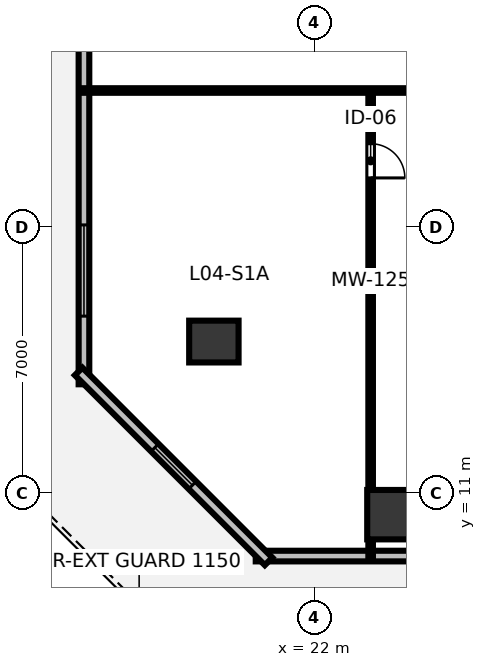
"""IFC4 building model, lengths in metres.
Left out: names, types, materials, properties, quantities, classifications, styles, units other than length and angle.
Written with IfcOpenShell. Run it as: python <this file> out.ifc"""

import sys

from ifc_helpers import new_model, si_unit, direction, frame, frame_2d, origin, origin_2d, place, context, subcontext, project, spatial, rectangle, hollow_rectangle, extrude, element, fill, save


model = new_model("IFC4")
c1 = context("Model", 3, precision=1e-05, world=origin(), true_north=direction((0.0, 1.0)))
c2 = subcontext(c1, "Body", "Model", "MODEL_VIEW")
j1 = project(units=[si_unit("LENGTHUNIT", "METRE"), si_unit("PLANEANGLEUNIT", "RADIAN")], contexts=[c1])
p1 = place(None, origin())
s1 = spatial("IfcSite", under=j1, at=p1, CompositionType="ELEMENT")
p2 = place(p1, origin())
s2 = spatial("IfcBuilding", under=s1, at=p2, CompositionType="ELEMENT")
p3 = place(p2, frame((0.0, 0.0, 18.5)))
s3 = spatial("IfcBuildingStorey", under=s2, at=p3, CompositionType="ELEMENT", Elevation=18.5)
for number, where, z_axis, x_axis in (
    (1, (23.943, 10.429, 0.0), (0.0, 0.0, 1.0), (1.0, 0.0, 0.0)),
    (2, (19.358, 14.984, 0.0), (0.0, 0.0, 1.0), (0.0, 1.0, 0.0)),
):
    element("IfcColumn", number, at=place(p3, frame(where, z_axis=z_axis, x_axis=x_axis)), inside=s3, PredefinedType="COLUMN", context=c2, shape_type="SweptSolid", body=[
        extrude(hollow_rectangle(XDim=1.1, YDim=1.3, WallThickness=0.07, at=origin_2d()), origin(), (0.0, 0.0, 1.0), 4.048),
    ])
p4 = place(p3, frame((20.46, 9.34, 0.0), z_axis=(0.0, 0.0, 1.0), x_axis=(1.0, 0.0, 0.0)))
e3 = element("IfcWall", 3, at=p4, inside=s3, PredefinedType="STANDARD", context=c2, shape_type="SweptSolid", body=[
    extrude(rectangle(XDim=51.08, YDim=0.28, at=frame_2d((25.54, 0.0))), origin(), (0.0, 0.0, 1.0), 4.05),
])
p5 = place(p4, frame((5.54, 0.0, 0.85)))
e4 = element("IfcOpeningElement", 4, at=p5, cuts=e3, PredefinedType="OPENING", context=c2, shape_type="SweptSolid", body=[
    extrude(rectangle(XDim=2.4, YDim=2.4, at=frame_2d((1.2, 1.2))), frame((0.0, 0.15, 0.0), z_axis=(0.0, -1.0, 0.0), x_axis=(1.0, 0.0, 0.0)), (0.0, 0.0, 1.0), 0.3),
])
p6 = place(p4, frame((9.3, 0.0, 0.85)))
e5 = element("IfcOpeningElement", 5, at=p6, cuts=e3, PredefinedType="OPENING", context=c2, shape_type="SweptSolid", body=[
    extrude(rectangle(XDim=2.4, YDim=2.4, at=frame_2d((1.2, 1.2))), frame((0.0, 0.15, 0.0), z_axis=(0.0, -1.0, 0.0), x_axis=(1.0, 0.0, 0.0)), (0.0, 0.0, 1.0), 0.3),
])
p7 = place(p4, frame((13.06, 0.0, 0.85)))
e6 = element("IfcOpeningElement", 6, at=p7, cuts=e3, PredefinedType="OPENING", context=c2, shape_type="SweptSolid", body=[
    extrude(rectangle(XDim=2.4, YDim=2.4, at=frame_2d((1.2, 1.2))), frame((0.0, 0.15, 0.0), z_axis=(0.0, -1.0, 0.0), x_axis=(1.0, 0.0, 0.0)), (0.0, 0.0, 1.0), 0.3),
])
p8 = place(p4, frame((16.82, 0.0, 0.85)))
e7 = element("IfcOpeningElement", 7, at=p8, cuts=e3, PredefinedType="OPENING", context=c2, shape_type="SweptSolid", body=[
    extrude(rectangle(XDim=2.4, YDim=2.4, at=frame_2d((1.2, 1.2))), frame((0.0, 0.15, 0.0), z_axis=(0.0, -1.0, 0.0), x_axis=(1.0, 0.0, 0.0)), (0.0, 0.0, 1.0), 0.3),
])
p9 = place(p4, frame((20.58, 0.0, 0.85)))
e8 = element("IfcOpeningElement", 8, at=p9, cuts=e3, PredefinedType="OPENING", context=c2, shape_type="SweptSolid", body=[
    extrude(rectangle(XDim=2.4, YDim=2.4, at=frame_2d((1.2, 1.2))), frame((0.0, 0.15, 0.0), z_axis=(0.0, -1.0, 0.0), x_axis=(1.0, 0.0, 0.0)), (0.0, 0.0, 1.0), 0.3),
])
p10 = place(p4, frame((28.1, 0.0, 0.85)))
e9 = element("IfcOpeningElement", 9, at=p10, cuts=e3, PredefinedType="OPENING", context=c2, shape_type="SweptSolid", body=[
    extrude(rectangle(XDim=2.4, YDim=2.4, at=frame_2d((1.2, 1.2))), frame((0.0, 0.15, 0.0), z_axis=(0.0, -1.0, 0.0), x_axis=(1.0, 0.0, 0.0)), (0.0, 0.0, 1.0), 0.3),
])
p11 = place(p4, frame((31.86, 0.0, 0.85)))
e10 = element("IfcOpeningElement", 10, at=p11, cuts=e3, PredefinedType="OPENING", context=c2, shape_type="SweptSolid", body=[
    extrude(rectangle(XDim=2.4, YDim=2.4, at=frame_2d((1.2, 1.2))), frame((0.0, 0.15, 0.0), z_axis=(0.0, -1.0, 0.0), x_axis=(1.0, 0.0, 0.0)), (0.0, 0.0, 1.0), 0.3),
])
p12 = place(p4, frame((35.62, 0.0, 0.85)))
e11 = element("IfcOpeningElement", 11, at=p12, cuts=e3, PredefinedType="OPENING", context=c2, shape_type="SweptSolid", body=[
    extrude(rectangle(XDim=2.4, YDim=2.4, at=frame_2d((1.2, 1.2))), frame((0.0, 0.15, 0.0), z_axis=(0.0, -1.0, 0.0), x_axis=(1.0, 0.0, 0.0)), (0.0, 0.0, 1.0), 0.3),
])
p13 = place(p4, frame((39.38, 0.0, 0.85)))
e12 = element("IfcOpeningElement", 12, at=p13, cuts=e3, PredefinedType="OPENING", context=c2, shape_type="SweptSolid", body=[
    extrude(rectangle(XDim=2.4, YDim=2.4, at=frame_2d((1.2, 1.2))), frame((0.0, 0.15, 0.0), z_axis=(0.0, -1.0, 0.0), x_axis=(1.0, 0.0, 0.0)), (0.0, 0.0, 1.0), 0.3),
])
p14 = place(p4, frame((43.14, 0.0, 0.85)))
e13 = element("IfcOpeningElement", 13, at=p14, cuts=e3, PredefinedType="OPENING", context=c2, shape_type="SweptSolid", body=[
    extrude(rectangle(XDim=2.4, YDim=2.4, at=frame_2d((1.2, 1.2))), frame((0.0, 0.15, 0.0), z_axis=(0.0, -1.0, 0.0), x_axis=(1.0, 0.0, 0.0)), (0.0, 0.0, 1.0), 0.3),
])
p15 = place(p3, frame((15.94, 50.14, 0.0), z_axis=(0.0, 0.0, 1.0), x_axis=(0.0, -1.0, 0.0)))
e14 = element("IfcWall", 14, at=p15, inside=s3, PredefinedType="STANDARD", context=c2, shape_type="SweptSolid", body=[
    extrude(rectangle(XDim=36.28, YDim=0.28, at=frame_2d((18.14, 0.0))), origin(), (0.0, 0.0, 1.0), 4.05),
])
p16 = place(p15, frame((24.39, 0.0, 0.0)))
e15 = element("IfcOpeningElement", 15, at=p16, cuts=e14, PredefinedType="OPENING", context=c2, shape_type="SweptSolid", body=[
    extrude(rectangle(XDim=1.6, YDim=2.15, at=frame_2d((0.8, 1.075))), frame((0.0, 0.15, 0.0), z_axis=(0.0, -1.0, 0.0), x_axis=(1.0, 0.0, 0.0)), (0.0, 0.0, 1.0), 0.3),
])
p17 = place(p15, frame((1.793, 0.0, 0.85)))
e16 = element("IfcOpeningElement", 16, at=p17, cuts=e14, PredefinedType="OPENING", context=c2, shape_type="SweptSolid", body=[
    extrude(rectangle(XDim=2.4, YDim=2.4, at=frame_2d((1.2, 1.2))), frame((0.0, 0.15, 0.0), z_axis=(0.0, -1.0, 0.0), x_axis=(1.0, 0.0, 0.0)), (0.0, 0.0, 1.0), 0.3),
])
p18 = place(p15, frame((9.367, 0.0, 0.85)))
e17 = element("IfcOpeningElement", 17, at=p18, cuts=e14, PredefinedType="OPENING", context=c2, shape_type="SweptSolid", body=[
    extrude(rectangle(XDim=2.4, YDim=2.4, at=frame_2d((1.2, 1.2))), frame((0.0, 0.15, 0.0), z_axis=(0.0, -1.0, 0.0), x_axis=(1.0, 0.0, 0.0)), (0.0, 0.0, 1.0), 0.3),
])
p19 = place(p15, frame((13.153, 0.0, 0.85)))
e18 = element("IfcOpeningElement", 18, at=p19, cuts=e14, PredefinedType="OPENING", context=c2, shape_type="SweptSolid", body=[
    extrude(rectangle(XDim=2.4, YDim=2.4, at=frame_2d((1.2, 1.2))), frame((0.0, 0.15, 0.0), z_axis=(0.0, -1.0, 0.0), x_axis=(1.0, 0.0, 0.0)), (0.0, 0.0, 1.0), 0.3),
])
p20 = place(p15, frame((20.727, 0.0, 0.85)))
e19 = element("IfcOpeningElement", 19, at=p20, cuts=e14, PredefinedType="OPENING", context=c2, shape_type="SweptSolid", body=[
    extrude(rectangle(XDim=2.4, YDim=2.4, at=frame_2d((1.2, 1.2))), frame((0.0, 0.15, 0.0), z_axis=(0.0, -1.0, 0.0), x_axis=(1.0, 0.0, 0.0)), (0.0, 0.0, 1.0), 0.3),
])
p21 = place(p15, frame((32.087, 0.0, 0.85)))
e20 = element("IfcOpeningElement", 20, at=p21, cuts=e14, PredefinedType="OPENING", context=c2, shape_type="SweptSolid", body=[
    extrude(rectangle(XDim=2.4, YDim=2.4, at=frame_2d((1.2, 1.2))), frame((0.0, 0.15, 0.0), z_axis=(0.0, -1.0, 0.0), x_axis=(1.0, 0.0, 0.0)), (0.0, 0.0, 1.0), 0.3),
])
p22 = place(p3, frame((15.8, 14.198, 0.0), z_axis=(0.0, 0.0, 1.0), x_axis=(0.707106781187, -0.707106781187, 0.0)))
e21 = element("IfcWall", 21, at=p22, inside=s3, PredefinedType="STANDARD", context=c2, shape_type="SweptSolid", body=[
    extrude(rectangle(XDim=7.068, YDim=0.28, at=frame_2d((3.534, 0.0))), origin(), (0.0, 0.0, 1.0), 4.05),
])
p23 = place(p22, frame((2.834, 0.0, 1.5)))
e22 = element("IfcOpeningElement", 22, at=p23, cuts=e21, PredefinedType="OPENING", context=c2, shape_type="SweptSolid", body=[
    extrude(rectangle(XDim=1.4, YDim=1.2, at=frame_2d((0.7, 0.6))), frame((0.0, 0.15, 0.0), z_axis=(0.0, -1.0, 0.0), x_axis=(1.0, 0.0, 0.0)), (0.0, 0.0, 1.0), 0.3),
])
p24 = place(p3, frame((23.484, 21.59, 0.0), z_axis=(0.0, 0.0, 1.0), x_axis=(0.0, -1.0, 0.0)))
e23 = element("IfcWall", 23, at=p24, inside=s3, PredefinedType="MOVABLE", context=c2, shape_type="SweptSolid", body=[
    extrude(rectangle(XDim=12.25, YDim=0.12, at=frame_2d((6.125, 0.0))), origin(), (0.0, 0.0, 1.0), 2.89),
])
p25 = place(p24, frame((1.4, 0.0, 0.0)))
e24 = element("IfcOpeningElement", 24, at=p25, cuts=e23, PredefinedType="OPENING", context=c2, shape_type="SweptSolid", body=[
    extrude(rectangle(XDim=0.9, YDim=2.15, at=frame_2d((0.45, 1.075))), frame((0.0, 0.07, 0.0), z_axis=(0.0, -1.0, 0.0), x_axis=(1.0, 0.0, 0.0)), (0.0, 0.0, 1.0), 0.14),
])
p26 = place(p3, frame((34.65, 21.59, 0.0), z_axis=(0.0, 0.0, 1.0), x_axis=(-1.0, 0.0, 0.0)))
e25 = element("IfcWall", 25, at=p26, inside=s3, PredefinedType="PARTITIONING", context=c2, shape_type="SweptSolid", body=[
    extrude(rectangle(XDim=18.71, YDim=0.12, at=frame_2d((9.355, 0.0))), origin(), (0.0, 0.0, 1.0), 2.89),
])
p27 = place(p21, origin())
e26 = element("IfcWindow", 26, at=p27, inside=s3, PartitioningType="SINGLE_PANEL", PredefinedType="WINDOW", context=c2, shape_type="SweptSolid", body=[
    extrude(rectangle(XDim=2.4, YDim=2.4, at=frame_2d((1.2, 1.2))), frame((0.0, 0.03, 0.0), z_axis=(0.0, -1.0, 0.0), x_axis=(1.0, 0.0, 0.0)), (0.0, 0.0, 1.0), 0.06),
])
fill(e20, e26)
p28 = place(p23, origin())
e27 = element("IfcWindow", 27, at=p28, inside=s3, PartitioningType="SINGLE_PANEL", PredefinedType="WINDOW", context=c2, shape_type="SweptSolid", body=[
    extrude(rectangle(XDim=1.4, YDim=1.2, at=frame_2d((0.7, 0.6))), frame((0.0, 0.03, 0.0), z_axis=(0.0, -1.0, 0.0), x_axis=(1.0, 0.0, 0.0)), (0.0, 0.0, 1.0), 0.06),
])
fill(e22, e27)
p29 = place(p25, origin())
e28 = element("IfcDoor", 28, at=p29, inside=s3, OperationType="SINGLE_SWING_RIGHT", PredefinedType="DOOR", context=c2, shape_type="SweptSolid", body=[
    extrude(rectangle(XDim=0.9, YDim=2.15, at=frame_2d((0.45, 1.075))), frame((0.0, 0.025, 0.0), z_axis=(0.0, -1.0, 0.0), x_axis=(1.0, 0.0, 0.0)), (0.0, 0.0, 1.0), 0.05),
])
fill(e24, e28)
save(model, sys.argv[1])
